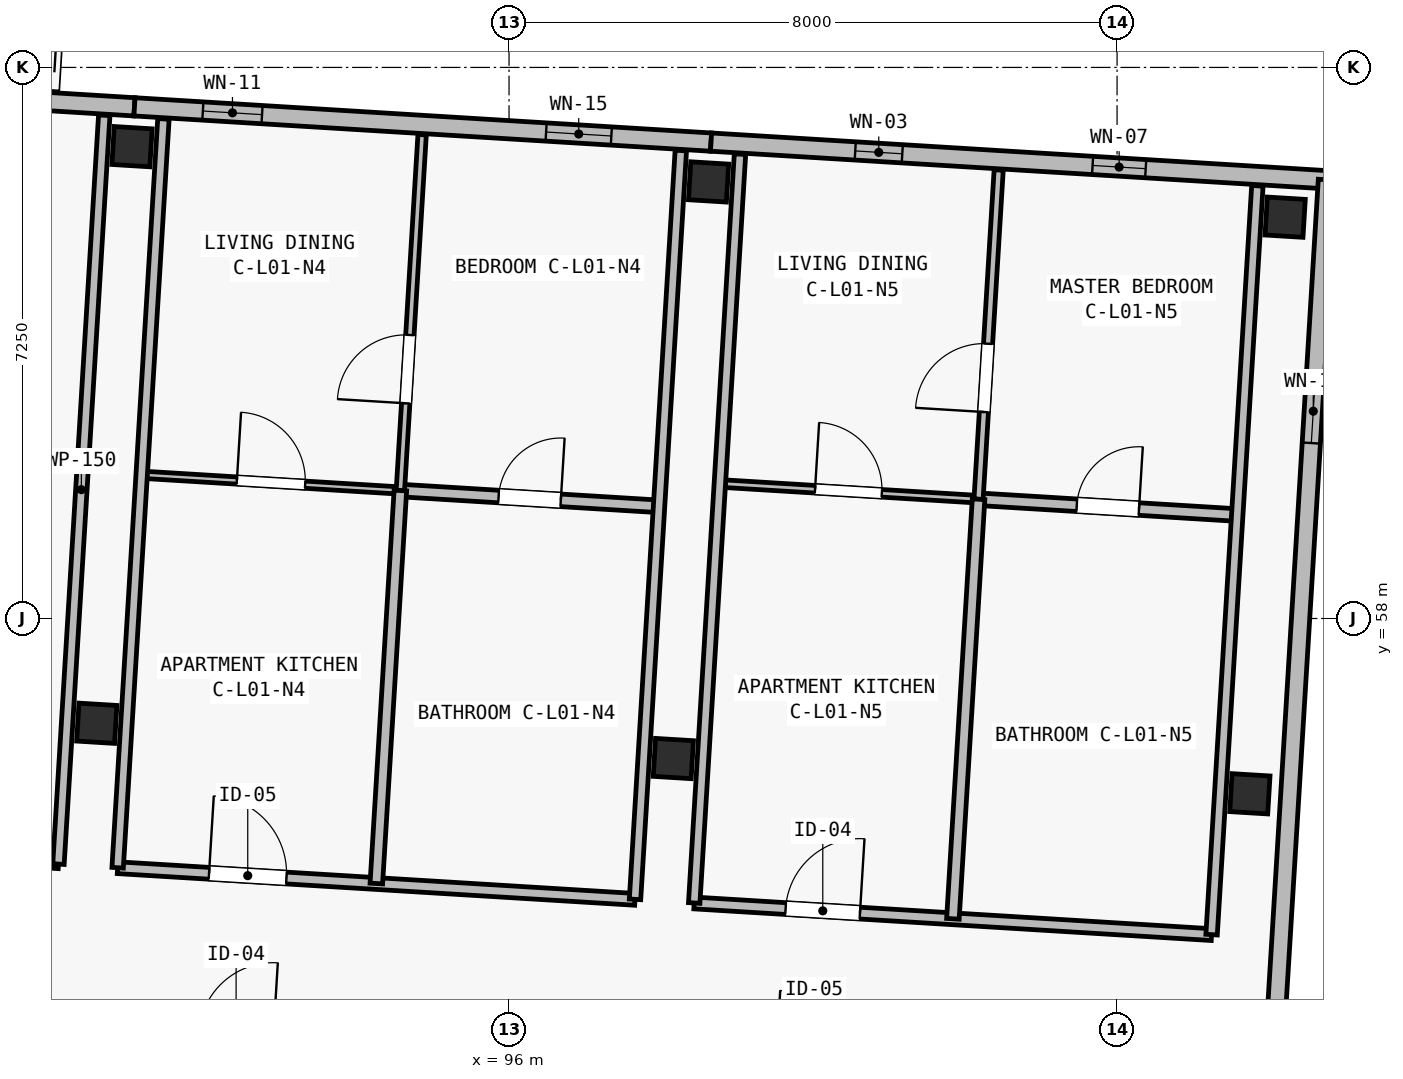
"""IFC4 building model, lengths in metres.
Left out: names, types, materials, properties, quantities, classifications, styles, units other than length and angle.
Written with IfcOpenShell. Run it as: python <this file> out.ifc"""

import sys

from ifc_helpers import new_model, si_unit, direction, frame, frame_2d, origin, origin_2d, place, context, subcontext, project, spatial, rectangle, extrude, element, fill, save


model = new_model("IFC4")
c1 = context("Model", 3, precision=1e-05, world=origin(), true_north=direction((0.0, 1.0)))
c2 = subcontext(c1, "Body", "Model", "MODEL_VIEW")
j1 = project(units=[si_unit("LENGTHUNIT", "METRE"), si_unit("PLANEANGLEUNIT", "RADIAN")], contexts=[c1])
p1 = place(None, origin())
s1 = spatial("IfcSite", under=j1, at=p1, CompositionType="ELEMENT")
p2 = place(p1, origin())
s2 = spatial("IfcBuilding", under=s1, at=p2, CompositionType="ELEMENT")
p3 = place(p2, frame((0.0, 0.0, 4.5)))
s3 = spatial("IfcBuildingStorey", under=s2, at=p3, CompositionType="ELEMENT", Elevation=4.5)
for number, where, z_axis, x_axis in (
    (1, (90.576, 56.622, 0.0), (0.0, 0.0, 1.0), (0.998, -0.061, 0.0)),
    (2, (91.04, 64.208, 0.0), (0.0, 0.0, 1.0), (0.998, -0.061, 0.0)),
    (3, (98.162, 56.158, 0.0), (0.0, 0.0, 1.0), (0.998, -0.061, 0.0)),
    (4, (98.626, 63.744, 0.0), (0.0, 0.0, 1.0), (0.998, -0.061, 0.0)),
    (5, (105.748, 55.694, 0.0), (0.0, 0.0, 1.0), (0.998, -0.061, 0.0)),
    (6, (106.211, 63.28, 0.0), (0.0, 0.0, 1.0), (0.998, -0.061, 0.0)),
):
    element("IfcColumn", number, at=place(p3, frame(where, z_axis=z_axis, x_axis=x_axis)), inside=s3, PredefinedType="COLUMN", context=c2, shape_type="SweptSolid", body=[
        extrude(rectangle(XDim=0.5, YDim=0.5, at=origin_2d()), origin(), (0.0, 0.0, 1.0), 3.9),
    ])
p4 = place(p3, frame((83.486, 65.196, 0.0), z_axis=(0.0, 0.0, 1.0), x_axis=(0.998135669243, -0.061034300063, 0.0)))
e7 = element("IfcWall", 7, at=p4, inside=s3, PredefinedType="SOLIDWALL", context=c2, shape_type="SweptSolid", body=[
    extrude(rectangle(XDim=7.6, YDim=0.24, at=frame_2d((3.8, 0.0))), origin(), (0.0, 0.0, 1.0), 3.65),
])
p5 = place(p4, frame((3.0, 0.0, 0.0)))
e8 = element("IfcOpeningElement", 8, at=p5, cuts=e7, PredefinedType="OPENING", context=c2, shape_type="SweptSolid", body=[
    extrude(rectangle(XDim=1.6, YDim=2.15, at=frame_2d((0.8, 1.075))), frame((0.0, 0.135, 0.0), z_axis=(0.0, -1.0, 0.0), x_axis=(1.0, 0.0, 0.0)), (0.0, 0.0, 1.0), 0.27),
])
p6 = place(p3, frame((91.072, 64.732, 0.0), z_axis=(0.0, 0.0, 1.0), x_axis=(0.998133591969, -0.061068261669, 0.0)))
e9 = element("IfcWall", 9, at=p6, inside=s3, PredefinedType="SOLIDWALL", context=c2, shape_type="SweptSolid", body=[
    extrude(rectangle(XDim=7.6, YDim=0.24, at=frame_2d((3.8, 0.0))), origin(), (0.0, 0.0, 1.0), 3.65),
])
p7 = place(p6, frame((0.902, 0.0, 0.5)))
e10 = element("IfcOpeningElement", 10, at=p7, cuts=e9, PredefinedType="OPENING", context=c2, shape_type="SweptSolid", body=[
    extrude(rectangle(XDim=0.78, YDim=2.2, at=frame_2d((0.39, 1.1))), frame((0.0, 0.135, 0.0), z_axis=(0.0, -1.0, 0.0), x_axis=(1.0, 0.0, 0.0)), (0.0, 0.0, 1.0), 0.27),
])
p8 = place(p6, frame((5.426, 0.0, 0.44)))
e11 = element("IfcOpeningElement", 11, at=p8, cuts=e9, PredefinedType="OPENING", context=c2, shape_type="SweptSolid", body=[
    extrude(rectangle(XDim=0.86, YDim=2.36, at=frame_2d((0.43, 1.18))), frame((0.0, 0.135, 0.0), z_axis=(0.0, -1.0, 0.0), x_axis=(1.0, 0.0, 0.0)), (0.0, 0.0, 1.0), 0.27),
])
p9 = place(p3, frame((98.658, 64.268, 0.0), z_axis=(0.0, 0.0, 1.0), x_axis=(0.998134248939, -0.061057522844, 0.0)))
e12 = element("IfcWall", 12, at=p9, inside=s3, PredefinedType="SOLIDWALL", context=c2, shape_type="SweptSolid", body=[
    extrude(rectangle(XDim=8.125, YDim=0.24, at=frame_2d((4.062, 0.0))), origin(), (0.0, 0.0, 1.0), 3.65),
])
p10 = place(p9, frame((1.901, 0.0, 0.44)))
e13 = element("IfcOpeningElement", 13, at=p10, cuts=e12, PredefinedType="OPENING", context=c2, shape_type="SweptSolid", body=[
    extrude(rectangle(XDim=0.62, YDim=2.28, at=frame_2d((0.31, 1.14))), frame((0.0, 0.135, 0.0), z_axis=(0.0, -1.0, 0.0), x_axis=(1.0, 0.0, 0.0)), (0.0, 0.0, 1.0), 0.27),
])
p11 = place(p9, frame((5.03, 0.0, 0.5)))
e14 = element("IfcOpeningElement", 14, at=p11, cuts=e12, PredefinedType="OPENING", context=c2, shape_type="SweptSolid", body=[
    extrude(rectangle(XDim=0.7, YDim=2.36, at=frame_2d((0.35, 1.18))), frame((0.0, 0.135, 0.0), z_axis=(0.0, -1.0, 0.0), x_axis=(1.0, 0.0, 0.0)), (0.0, 0.0, 1.0), 0.27),
])
p12 = place(p3, frame((106.768, 63.771, 0.0), z_axis=(0.0, 0.0, 1.0), x_axis=(-0.061053332998, -0.99813450523, 0.0)))
e15 = element("IfcWall", 15, at=p12, inside=s3, PredefinedType="SOLIDWALL", context=c2, shape_type="SweptSolid", body=[
    extrude(rectangle(XDim=20.65, YDim=0.24, at=frame_2d((10.325, 0.0))), origin(), (0.0, 0.0, 1.0), 3.65),
])
p13 = place(p12, frame((2.63, 0.0, 0.52)))
e16 = element("IfcOpeningElement", 16, at=p13, cuts=e15, PredefinedType="OPENING", context=c2, shape_type="SweptSolid", body=[
    extrude(rectangle(XDim=0.84, YDim=2.28, at=frame_2d((0.42, 1.14))), frame((0.0, 0.135, 0.0), z_axis=(0.0, -1.0, 0.0), x_axis=(1.0, 0.0, 0.0)), (0.0, 0.0, 1.0), 0.27),
])
p14 = place(p12, frame((16.98, 0.0, 0.45)))
e17 = element("IfcOpeningElement", 17, at=p14, cuts=e15, PredefinedType="OPENING", context=c2, shape_type="SweptSolid", body=[
    extrude(rectangle(XDim=0.68, YDim=2.24, at=frame_2d((0.34, 1.12))), frame((0.0, 0.135, 0.0), z_axis=(0.0, -1.0, 0.0), x_axis=(1.0, 0.0, 0.0)), (0.0, 0.0, 1.0), 0.27),
])
p15 = place(p3, frame((83.007, 53.097, 0.0), z_axis=(0.0, 0.0, 1.0), x_axis=(0.998135666539, -0.061034344288, 0.0)))
e18 = element("IfcWall", 18, at=p15, inside=s3, PredefinedType="PARTITIONING", context=c2, shape_type="SweptSolid", body=[
    extrude(rectangle(XDim=7.08, YDim=0.155, at=frame_2d((3.54, 0.0))), origin(), (0.0, 0.0, 1.0), 3.62),
])
p16 = place(p15, frame((1.33, 0.0, 0.0)))
e19 = element("IfcOpeningElement", 19, at=p16, cuts=e18, PredefinedType="OPENING", context=c2, shape_type="SweptSolid", body=[
    extrude(rectangle(XDim=1.02, YDim=2.2, at=frame_2d((0.51, 1.1))), frame((0.0, 0.093, 0.0), z_axis=(0.0, -1.0, 0.0), x_axis=(1.0, 0.0, 0.0)), (0.0, 0.0, 1.0), 0.185),
])
p17 = place(p3, frame((83.265, 55.185, 0.0), z_axis=(0.0, 0.0, 1.0), x_axis=(0.998135531673, -0.061036549799, 0.0)))
e20 = element("IfcWall", 20, at=p17, inside=s3, PredefinedType="PARTITIONING", context=c2, shape_type="SweptSolid", body=[
    extrude(rectangle(XDim=6.82, YDim=0.12, at=frame_2d((3.41, 0.0))), origin(), (0.0, 0.0, 1.0), 3.62),
])
p18 = place(p17, frame((1.6, 0.0, 0.0)))
e21 = element("IfcOpeningElement", 21, at=p18, cuts=e20, PredefinedType="OPENING", context=c2, shape_type="SweptSolid", body=[
    extrude(rectangle(XDim=1.15, YDim=2.15, at=frame_2d((0.575, 1.075))), frame((0.0, 0.075, 0.0), z_axis=(0.0, -1.0, 0.0), x_axis=(1.0, 0.0, 0.0)), (0.0, 0.0, 1.0), 0.15),
])
p19 = place(p3, frame((90.072, 54.769, 0.0), z_axis=(0.0, 0.0, 1.0), x_axis=(0.061047700465, 0.998134849741, 0.0)))
e22 = element("IfcWall", 22, at=p19, inside=s3, PredefinedType="PARTITIONING", context=c2, shape_type="SweptSolid", body=[
    extrude(rectangle(XDim=9.87, YDim=0.15, at=frame_2d((4.935, 0.0))), origin(), (0.0, 0.0, 1.0), 3.62),
])
p20 = place(p3, frame((90.85, 54.721, 0.0), z_axis=(0.0, 0.0, 1.0), x_axis=(0.998135665032, -0.06103436893, 0.0)))
e23 = element("IfcWall", 23, at=p20, inside=s3, PredefinedType="PARTITIONING", context=c2, shape_type="SweptSolid", body=[
    extrude(rectangle(XDim=6.82, YDim=0.155, at=frame_2d((3.41, 0.0))), origin(), (0.0, 0.0, 1.0), 3.62),
])
p21 = place(p20, frame((1.205, 0.0, 0.0)))
e24 = element("IfcOpeningElement", 24, at=p21, cuts=e23, PredefinedType="OPENING", context=c2, shape_type="SweptSolid", body=[
    extrude(rectangle(XDim=1.02, YDim=2.2, at=frame_2d((0.51, 1.1))), frame((0.0, 0.093, 0.0), z_axis=(0.0, -1.0, 0.0), x_axis=(1.0, 0.0, 0.0)), (0.0, 0.0, 1.0), 0.185),
])
p22 = place(p3, frame((91.167, 59.892, 0.0), z_axis=(0.0, 0.0, 1.0), x_axis=(0.998133617109, -0.061067850767, 0.0)))
e25 = element("IfcWall", 25, at=p22, inside=s3, PredefinedType="PARTITIONING", context=c2, shape_type="SweptSolid", body=[
    extrude(rectangle(XDim=3.41, YDim=0.095, at=frame_2d((1.705, 0.0))), origin(), (0.0, 0.0, 1.0), 3.62),
])
p23 = place(p22, frame((1.255, 0.0, 0.0)))
e26 = element("IfcOpeningElement", 26, at=p23, cuts=e25, PredefinedType="OPENING", context=c2, shape_type="SweptSolid", body=[
    extrude(rectangle(XDim=0.9, YDim=2.1, at=frame_2d((0.45, 1.05))), frame((0.0, 0.062, 0.0), z_axis=(0.0, -1.0, 0.0), x_axis=(1.0, 0.0, 0.0)), (0.0, 0.0, 1.0), 0.125),
])
p24 = place(p3, frame((94.57, 59.684, 0.0), z_axis=(0.0, 0.0, 1.0), x_axis=(0.998133350094, -0.061072214879, 0.0)))
e27 = element("IfcWall", 27, at=p24, inside=s3, PredefinedType="PLUMBINGWALL", context=c2, shape_type="SweptSolid", body=[
    extrude(rectangle(XDim=3.41, YDim=0.165, at=frame_2d((1.705, 0.0))), origin(), (0.0, 0.0, 1.0), 3.62),
])
p25 = place(p24, frame((1.295, 0.0, 0.0)))
e28 = element("IfcOpeningElement", 28, at=p25, cuts=e27, PredefinedType="OPENING", context=c2, shape_type="SweptSolid", body=[
    extrude(rectangle(XDim=0.82, YDim=2.08, at=frame_2d((0.41, 1.04))), frame((0.0, 0.097, 0.0), z_axis=(0.0, -1.0, 0.0), x_axis=(1.0, 0.0, 0.0)), (0.0, 0.0, 1.0), 0.195),
])
p26 = place(p3, frame((94.57, 59.684, 0.0), z_axis=(0.0, 0.0, 1.0), x_axis=(0.061062434628, 0.998133948465, 0.0)))
e29 = element("IfcWall", 29, at=p26, inside=s3, PredefinedType="PARTITIONING", context=c2, shape_type="SweptSolid", body=[
    extrude(rectangle(XDim=4.69, YDim=0.11, at=frame_2d((2.345, 0.0))), origin(), (0.0, 0.0, 1.0), 3.62),
])
p27 = place(p26, frame((1.15, 0.0, 0.0)))
e30 = element("IfcOpeningElement", 30, at=p27, cuts=e29, PredefinedType="OPENING", context=c2, shape_type="SweptSolid", body=[
    extrude(rectangle(XDim=0.9, YDim=2.1, at=frame_2d((0.45, 1.05))), frame((0.0, 0.07, 0.0), z_axis=(0.0, -1.0, 0.0), x_axis=(1.0, 0.0, 0.0)), (0.0, 0.0, 1.0), 0.14),
])
p28 = place(p3, frame((94.254, 54.513, 0.0), z_axis=(0.0, 0.0, 1.0), x_axis=(0.061081315517, 0.998132793217, 0.0)))
e31 = element("IfcWall", 31, at=p28, inside=s3, PredefinedType="PLUMBINGWALL", context=c2, shape_type="SweptSolid", body=[
    extrude(rectangle(XDim=5.18, YDim=0.165, at=frame_2d((2.59, 0.0))), origin(), (0.0, 0.0, 1.0), 3.62),
])
for number, where, z_axis, x_axis in (
    (32, (90.85, 54.721, 0.0), (0.0, 0.0, 1.0), (0.061, 0.998, 0.0)),
    (33, (97.658, 54.305, 0.0), (0.0, 0.0, 1.0), (0.061, 0.998, 0.0)),
):
    element("IfcWall", number, at=place(p3, frame(where, z_axis=z_axis, x_axis=x_axis)), inside=s3, PredefinedType="PARTITIONING", context=c2, shape_type="SweptSolid", body=[
        extrude(rectangle(XDim=9.87, YDim=0.15, at=frame_2d((4.935, 0.0))), origin(), (0.0, 0.0, 1.0), 3.62),
    ])
p29 = place(p3, frame((98.436, 54.258, 0.0), z_axis=(0.0, 0.0, 1.0), x_axis=(0.998133350094, -0.061072214879, 0.0)))
e34 = element("IfcWall", 34, at=p29, inside=s3, PredefinedType="PARTITIONING", context=c2, shape_type="SweptSolid", body=[
    extrude(rectangle(XDim=6.82, YDim=0.155, at=frame_2d((3.41, 0.0))), origin(), (0.0, 0.0, 1.0), 3.62),
])
p30 = place(p29, frame((1.205, 0.0, 0.0)))
e35 = element("IfcOpeningElement", 35, at=p30, cuts=e34, PredefinedType="OPENING", context=c2, shape_type="SweptSolid", body=[
    extrude(rectangle(XDim=0.98, YDim=2.15, at=frame_2d((0.49, 1.075))), frame((0.0, 0.093, 0.0), z_axis=(0.0, -1.0, 0.0), x_axis=(1.0, 0.0, 0.0)), (0.0, 0.0, 1.0), 0.185),
])
p31 = place(p3, frame((98.774, 59.777, 0.0), z_axis=(0.0, 0.0, 1.0), x_axis=(0.998137711988, -0.061000884486, 0.0)))
e36 = element("IfcWall", 36, at=p31, inside=s3, PredefinedType="PARTITIONING", context=c2, shape_type="SweptSolid", body=[
    extrude(rectangle(XDim=3.41, YDim=0.1, at=frame_2d((1.705, 0.0))), origin(), (0.0, 0.0, 1.0), 3.62),
])
p32 = place(p31, frame((1.255, 0.0, 0.0)))
e37 = element("IfcOpeningElement", 37, at=p32, cuts=e36, PredefinedType="OPENING", context=c2, shape_type="SweptSolid", body=[
    extrude(rectangle(XDim=0.88, YDim=2.1, at=frame_2d((0.44, 1.05))), frame((0.0, 0.065, 0.0), z_axis=(0.0, -1.0, 0.0), x_axis=(1.0, 0.0, 0.0)), (0.0, 0.0, 1.0), 0.13),
])
p33 = place(p3, frame((102.177, 59.569, 0.0), z_axis=(0.0, 0.0, 1.0), x_axis=(0.998133350094, -0.061072214879, 0.0)))
e38 = element("IfcWall", 38, at=p33, inside=s3, PredefinedType="PLUMBINGWALL", context=c2, shape_type="SweptSolid", body=[
    extrude(rectangle(XDim=3.41, YDim=0.165, at=frame_2d((1.705, 0.0))), origin(), (0.0, 0.0, 1.0), 3.62),
])
p34 = place(p33, frame((1.295, 0.0, 0.0)))
e39 = element("IfcOpeningElement", 39, at=p34, cuts=e38, PredefinedType="OPENING", context=c2, shape_type="SweptSolid", body=[
    extrude(rectangle(XDim=0.82, YDim=2.08, at=frame_2d((0.41, 1.04))), frame((0.0, 0.097, 0.0), z_axis=(0.0, -1.0, 0.0), x_axis=(1.0, 0.0, 0.0)), (0.0, 0.0, 1.0), 0.195),
])
p35 = place(p3, frame((102.177, 59.569, 0.0), z_axis=(0.0, 0.0, 1.0), x_axis=(0.061036861365, 0.998135512621, 0.0)))
e40 = element("IfcWall", 40, at=p35, inside=s3, PredefinedType="PARTITIONING", context=c2, shape_type="SweptSolid", body=[
    extrude(rectangle(XDim=4.34, YDim=0.12, at=frame_2d((2.17, 0.0))), origin(), (0.0, 0.0, 1.0), 3.62),
])
p36 = place(p35, frame((1.15, 0.0, 0.0)))
e41 = element("IfcOpeningElement", 41, at=p36, cuts=e40, PredefinedType="OPENING", context=c2, shape_type="SweptSolid", body=[
    extrude(rectangle(XDim=0.9, YDim=2.1, at=frame_2d((0.45, 1.05))), frame((0.0, 0.075, 0.0), z_axis=(0.0, -1.0, 0.0), x_axis=(1.0, 0.0, 0.0)), (0.0, 0.0, 1.0), 0.15),
])
p37 = place(p3, frame((101.84, 54.049, 0.0), z_axis=(0.0, 0.0, 1.0), x_axis=(0.061056206715, 0.998134329447, 0.0)))
e42 = element("IfcWall", 42, at=p37, inside=s3, PredefinedType="PLUMBINGWALL", context=c2, shape_type="SweptSolid", body=[
    extrude(rectangle(XDim=5.53, YDim=0.165, at=frame_2d((2.765, 0.0))), origin(), (0.0, 0.0, 1.0), 3.62),
])
for number, where, z_axis, x_axis in (
    (43, (98.436, 54.258, 0.0), (0.0, 0.0, 1.0), (0.061, 0.998, 0.0)),
    (44, (105.243, 53.841, 0.0), (0.0, 0.0, 1.0), (0.061, 0.998, 0.0)),
):
    element("IfcWall", number, at=place(p3, frame(where, z_axis=z_axis, x_axis=x_axis)), inside=s3, PredefinedType="PARTITIONING", context=c2, shape_type="SweptSolid", body=[
        extrude(rectangle(XDim=9.87, YDim=0.15, at=frame_2d((4.935, 0.0))), origin(), (0.0, 0.0, 1.0), 3.62),
    ])
p38 = place(p7, origin())
e45 = element("IfcWindow", 45, at=p38, inside=s3, PartitioningType="SINGLE_PANEL", PredefinedType="WINDOW", context=c2, shape_type="SweptSolid", body=[
    extrude(rectangle(XDim=0.78, YDim=2.2, at=frame_2d((0.39, 1.1))), frame((0.0, 0.03, 0.0), z_axis=(0.0, -1.0, 0.0), x_axis=(1.0, 0.0, 0.0)), (0.0, 0.0, 1.0), 0.06),
])
fill(e10, e45)
p39 = place(p8, origin())
e46 = element("IfcWindow", 46, at=p39, inside=s3, PartitioningType="SINGLE_PANEL", PredefinedType="WINDOW", context=c2, shape_type="SweptSolid", body=[
    extrude(rectangle(XDim=0.86, YDim=2.36, at=frame_2d((0.43, 1.18))), frame((0.0, 0.03, 0.0), z_axis=(0.0, -1.0, 0.0), x_axis=(1.0, 0.0, 0.0)), (0.0, 0.0, 1.0), 0.06),
])
fill(e11, e46)
p40 = place(p10, origin())
e47 = element("IfcWindow", 47, at=p40, inside=s3, PartitioningType="SINGLE_PANEL", PredefinedType="WINDOW", context=c2, shape_type="SweptSolid", body=[
    extrude(rectangle(XDim=0.62, YDim=2.28, at=frame_2d((0.31, 1.14))), frame((0.0, 0.03, 0.0), z_axis=(0.0, -1.0, 0.0), x_axis=(1.0, 0.0, 0.0)), (0.0, 0.0, 1.0), 0.06),
])
fill(e13, e47)
p41 = place(p11, origin())
e48 = element("IfcWindow", 48, at=p41, inside=s3, PartitioningType="SINGLE_PANEL", PredefinedType="WINDOW", context=c2, shape_type="SweptSolid", body=[
    extrude(rectangle(XDim=0.7, YDim=2.36, at=frame_2d((0.35, 1.18))), frame((0.0, 0.03, 0.0), z_axis=(0.0, -1.0, 0.0), x_axis=(1.0, 0.0, 0.0)), (0.0, 0.0, 1.0), 0.06),
])
fill(e14, e48)
p42 = place(p13, origin())
e49 = element("IfcWindow", 49, at=p42, inside=s3, PartitioningType="SINGLE_PANEL", PredefinedType="WINDOW", context=c2, shape_type="SweptSolid", body=[
    extrude(rectangle(XDim=0.84, YDim=2.28, at=frame_2d((0.42, 1.14))), frame((0.0, 0.03, 0.0), z_axis=(0.0, -1.0, 0.0), x_axis=(1.0, 0.0, 0.0)), (0.0, 0.0, 1.0), 0.06),
])
fill(e16, e49)
p43 = place(p21, origin())
e50 = element("IfcDoor", 50, at=p43, inside=s3, OperationType="SINGLE_SWING_LEFT", PredefinedType="DOOR", context=c2, shape_type="SweptSolid", body=[
    extrude(rectangle(XDim=1.02, YDim=2.2, at=frame_2d((0.51, 1.1))), frame((0.0, 0.025, 0.0), z_axis=(0.0, -1.0, 0.0), x_axis=(1.0, 0.0, 0.0)), (0.0, 0.0, 1.0), 0.05),
])
fill(e24, e50)
p44 = place(p23, origin())
e51 = element("IfcDoor", 51, at=p44, inside=s3, OperationType="SINGLE_SWING_LEFT", PredefinedType="DOOR", context=c2, shape_type="SweptSolid", body=[
    extrude(rectangle(XDim=0.9, YDim=2.1, at=frame_2d((0.45, 1.05))), frame((0.0, 0.025, 0.0), z_axis=(0.0, -1.0, 0.0), x_axis=(1.0, 0.0, 0.0)), (0.0, 0.0, 1.0), 0.05),
])
fill(e26, e51)
p45 = place(p25, origin())
e52 = element("IfcDoor", 52, at=p45, inside=s3, OperationType="SINGLE_SWING_RIGHT", PredefinedType="DOOR", context=c2, shape_type="SweptSolid", body=[
    extrude(rectangle(XDim=0.82, YDim=2.08, at=frame_2d((0.41, 1.04))), frame((0.0, 0.025, 0.0), z_axis=(0.0, -1.0, 0.0), x_axis=(1.0, 0.0, 0.0)), (0.0, 0.0, 1.0), 0.05),
])
fill(e28, e52)
p46 = place(p27, origin())
e53 = element("IfcDoor", 53, at=p46, inside=s3, OperationType="SINGLE_SWING_LEFT", PredefinedType="DOOR", context=c2, shape_type="SweptSolid", body=[
    extrude(rectangle(XDim=0.9, YDim=2.1, at=frame_2d((0.45, 1.05))), frame((0.0, 0.025, 0.0), z_axis=(0.0, -1.0, 0.0), x_axis=(1.0, 0.0, 0.0)), (0.0, 0.0, 1.0), 0.05),
])
fill(e30, e53)
p47 = place(p30, origin())
e54 = element("IfcDoor", 54, at=p47, inside=s3, OperationType="SINGLE_SWING_RIGHT", PredefinedType="DOOR", context=c2, shape_type="SweptSolid", body=[
    extrude(rectangle(XDim=0.98, YDim=2.15, at=frame_2d((0.49, 1.075))), frame((0.0, 0.025, 0.0), z_axis=(0.0, -1.0, 0.0), x_axis=(1.0, 0.0, 0.0)), (0.0, 0.0, 1.0), 0.05),
])
fill(e35, e54)
p48 = place(p32, origin())
e55 = element("IfcDoor", 55, at=p48, inside=s3, OperationType="SINGLE_SWING_LEFT", PredefinedType="DOOR", context=c2, shape_type="SweptSolid", body=[
    extrude(rectangle(XDim=0.88, YDim=2.1, at=frame_2d((0.44, 1.05))), frame((0.0, 0.025, 0.0), z_axis=(0.0, -1.0, 0.0), x_axis=(1.0, 0.0, 0.0)), (0.0, 0.0, 1.0), 0.05),
])
fill(e37, e55)
p49 = place(p34, origin())
e56 = element("IfcDoor", 56, at=p49, inside=s3, OperationType="SINGLE_SWING_RIGHT", PredefinedType="DOOR", context=c2, shape_type="SweptSolid", body=[
    extrude(rectangle(XDim=0.82, YDim=2.08, at=frame_2d((0.41, 1.04))), frame((0.0, 0.025, 0.0), z_axis=(0.0, -1.0, 0.0), x_axis=(1.0, 0.0, 0.0)), (0.0, 0.0, 1.0), 0.05),
])
fill(e39, e56)
p50 = place(p36, origin())
e57 = element("IfcDoor", 57, at=p50, inside=s3, OperationType="SINGLE_SWING_LEFT", PredefinedType="DOOR", context=c2, shape_type="SweptSolid", body=[
    extrude(rectangle(XDim=0.9, YDim=2.1, at=frame_2d((0.45, 1.05))), frame((0.0, 0.025, 0.0), z_axis=(0.0, -1.0, 0.0), x_axis=(1.0, 0.0, 0.0)), (0.0, 0.0, 1.0), 0.05),
])
fill(e41, e57)
save(model, sys.argv[1])
